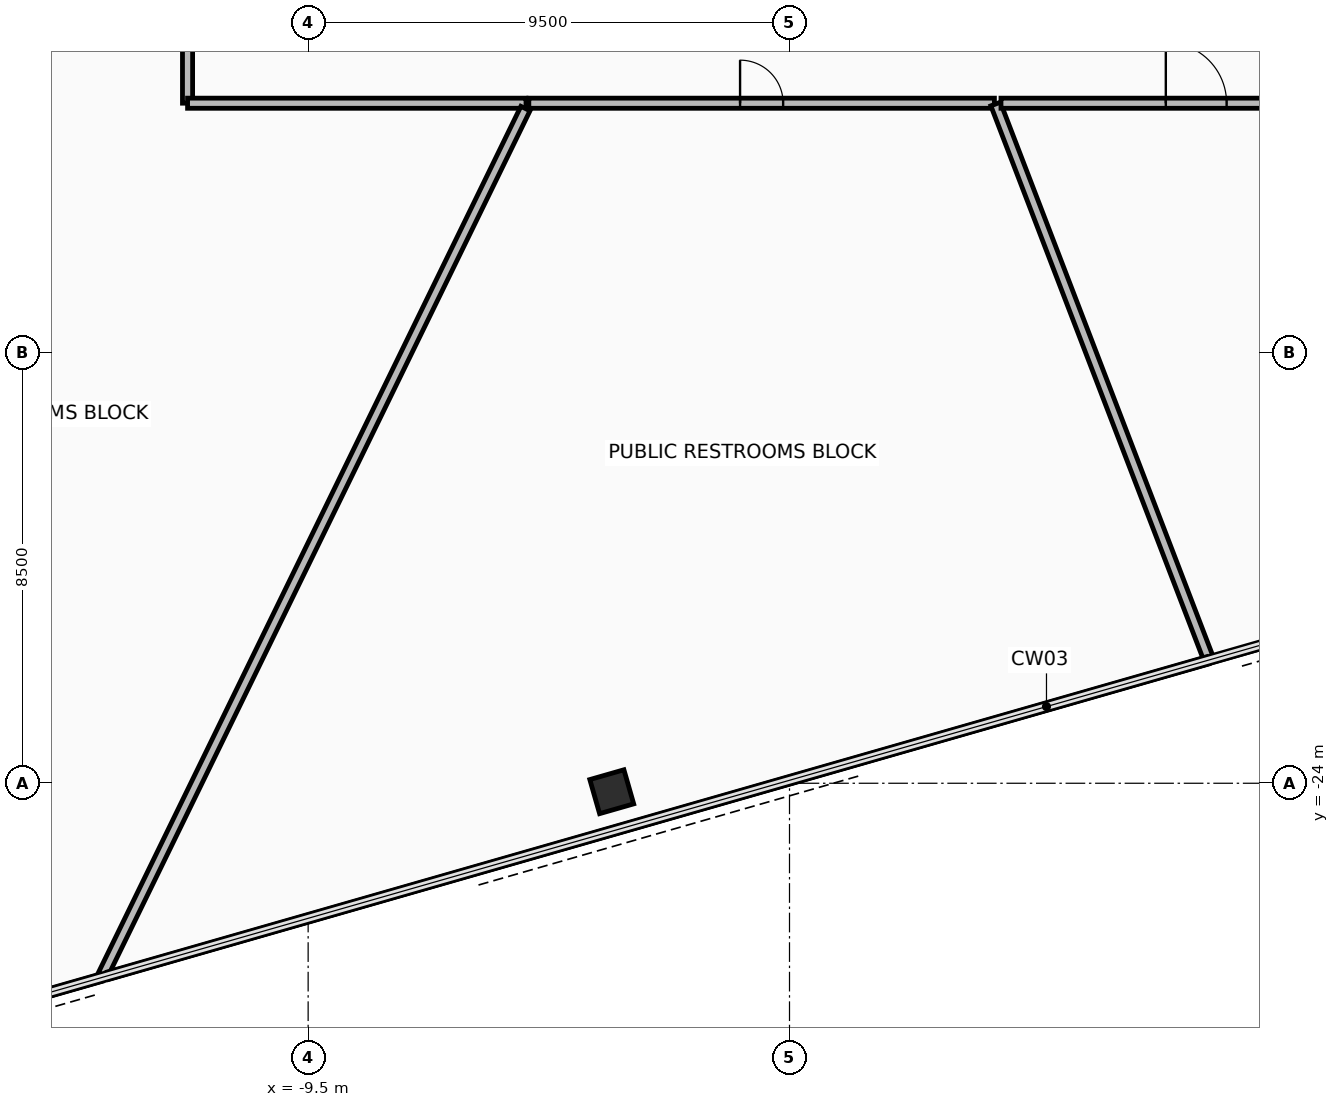
"""IFC4 building model, lengths in metres.
Left out: names, types, materials, properties, quantities, classifications, styles, units other than length and angle.
Written with IfcOpenShell. Run it as: python <this file> out.ifc"""

import sys

from ifc_helpers import new_model, si_unit, direction, frame, frame_2d, origin, origin_2d, place, context, subcontext, project, spatial, rectangle, hollow_rectangle, extrude, element, fill, save


model = new_model("IFC4")
c1 = context("Model", 3, precision=1e-05, world=origin(), true_north=direction((0.0, 1.0)))
c2 = subcontext(c1, "Body", "Model", "MODEL_VIEW")
j1 = project(units=[si_unit("LENGTHUNIT", "METRE"), si_unit("PLANEANGLEUNIT", "RADIAN")], contexts=[c1])
p1 = place(None, origin())
s1 = spatial("IfcSite", under=j1, at=p1, CompositionType="ELEMENT")
p2 = place(p1, origin())
s2 = spatial("IfcBuilding", under=s1, at=p2, CompositionType="ELEMENT")
p3 = place(p2, frame((0.0, 0.0, 86.1)))
s3 = spatial("IfcBuildingStorey", under=s2, at=p3, CompositionType="ELEMENT", Elevation=86.1)
p4 = place(p3, frame((-3.508, -24.167, -0.19), z_axis=(0.0, 0.0, 1.0), x_axis=(0.961261695938, 0.275637355817, 0.0)))
e1 = element("IfcColumn", 1, at=p4, inside=s3, PredefinedType="COLUMN", context=c2, shape_type="SweptSolid", body=[
    extrude(hollow_rectangle(XDim=0.7, YDim=0.7, WallThickness=0.04, at=origin_2d()), origin(), (0.0, 0.0, 1.0), 3.79),
])
p5 = place(p3, frame((-11.88, -3.44, 0.0), z_axis=(0.0, 0.0, 1.0), x_axis=(0.0, -1.0, 0.0)))
e2 = element("IfcWall", 2, at=p5, inside=s3, PredefinedType="PARTITIONING", context=c2, shape_type="SweptSolid", body=[
    extrude(rectangle(XDim=7.14, YDim=0.2, at=frame_2d((3.57, 0.0))), origin(), (0.0, 0.0, 1.0), 2.805),
])
p6 = place(p5, frame((3.145, 0.0, 0.0)))
e3 = element("IfcOpeningElement", 3, at=p6, cuts=e2, PredefinedType="OPENING", context=c2, shape_type="SweptSolid", body=[
    extrude(rectangle(XDim=0.85, YDim=2.1, at=frame_2d((0.425, 1.05))), frame((0.0, 0.11, 0.0), z_axis=(0.0, -1.0, 0.0), x_axis=(1.0, 0.0, 0.0)), (0.0, 0.0, 1.0), 0.22),
])
p7 = place(p3, frame((-11.879, -10.58, 0.0), z_axis=(0.0, 0.0, 1.0), x_axis=(1.0, 0.0, 0.0)))
e4 = element("IfcWall", 4, at=p7, inside=s3, PredefinedType="PARTITIONING", context=c2, shape_type="SweptSolid", body=[
    extrude(rectangle(XDim=6.679, YDim=0.2, at=frame_2d((3.34, 0.0))), origin(), (0.0, 0.0, 1.0), 2.805),
])
p8 = place(p3, frame((-5.211, -10.685, 0.0), z_axis=(0.0, 0.0, 1.0), x_axis=(-0.438373182397, -0.898793053464, 0.0)))
e5 = element("IfcWall", 5, at=p8, inside=s3, PredefinedType="PARTITIONING", context=c2, shape_type="SweptSolid", body=[
    extrude(rectangle(XDim=19.069, YDim=0.2, at=frame_2d((9.535, 0.0))), origin(), (0.0, 0.0, 1.0), 2.605),
])
p9 = place(p3, frame((-13.586, -27.837, 0.0), z_axis=(0.0, 0.0, 1.0), x_axis=(-0.961259140901, -0.275646266135, 0.0)))
e6 = element("IfcWall", 6, at=p9, inside=s3, PredefinedType="PARTITIONING", context=c2, shape_type="SweptSolid", body=[
    extrude(rectangle(XDim=7.841, YDim=0.15, at=frame_2d((3.92, 0.0))), origin(), (0.0, 0.0, 1.0), 3.41),
])
p10 = place(p3, frame((-5.145, -10.58, 0.0), z_axis=(0.0, 0.0, 1.0), x_axis=(1.0, 0.0, 0.0)))
e7 = element("IfcWall", 7, at=p10, inside=s3, PredefinedType="PARTITIONING", context=c2, shape_type="SweptSolid", body=[
    extrude(rectangle(XDim=9.189, YDim=0.2, at=frame_2d((4.594, 0.0))), origin(), (0.0, 0.0, 1.0), 2.805),
])
p11 = place(p10, frame((4.169, 0.0, 0.0)))
e8 = element("IfcOpeningElement", 8, at=p11, cuts=e7, PredefinedType="OPENING", context=c2, shape_type="SweptSolid", body=[
    extrude(rectangle(XDim=0.85, YDim=2.1, at=frame_2d((0.425, 1.05))), frame((0.0, 0.11, 0.0), z_axis=(0.0, -1.0, 0.0), x_axis=(1.0, 0.0, 0.0)), (0.0, 0.0, 1.0), 0.22),
])
p12 = place(p3, frame((4.067, -10.596, 0.0), z_axis=(0.0, 0.0, 1.0), x_axis=(0.358376224971, -0.933577249817, 0.0)))
e9 = element("IfcWall", 9, at=p12, inside=s3, PredefinedType="PARTITIONING", context=c2, shape_type="SweptSolid", body=[
    extrude(rectangle(XDim=11.725, YDim=0.2, at=frame_2d((5.862, 0.0))), origin(), (0.0, 0.0, 1.0), 2.605),
])
p13 = place(p3, frame((8.253, -21.575, 0.0), z_axis=(0.0, 0.0, 1.0), x_axis=(-0.961261412197, -0.275638345338, 0.0)))
e10 = element("IfcWall", 10, at=p13, inside=s3, PredefinedType="PARTITIONING", context=c2, shape_type="SweptSolid", body=[
    extrude(rectangle(XDim=22.567, YDim=0.15, at=frame_2d((11.283, 0.0))), origin(), (0.0, 0.0, 1.0), 3.41),
])
p14 = place(p3, frame((4.174, -10.58, 0.0), z_axis=(0.0, 0.0, 1.0), x_axis=(1.0, 0.0, 0.0)))
e11 = element("IfcWall", 11, at=p14, inside=s3, PredefinedType="PARTITIONING", context=c2, shape_type="SweptSolid", body=[
    extrude(rectangle(XDim=7.706, YDim=0.2, at=frame_2d((3.853, 0.0))), origin(), (0.0, 0.0, 1.0), 2.805),
])
p15 = place(p14, frame((3.253, 0.0, 0.0)))
e12 = element("IfcOpeningElement", 12, at=p15, cuts=e11, PredefinedType="OPENING", context=c2, shape_type="SweptSolid", body=[
    extrude(rectangle(XDim=1.2, YDim=2.15, at=frame_2d((0.6, 1.075))), frame((0.0, 0.11, 0.0), z_axis=(0.0, -1.0, 0.0), x_axis=(1.0, 0.0, 0.0)), (0.0, 0.0, 1.0), 0.22),
])
p16 = place(p11, origin())
e13 = element("IfcDoor", 13, at=p16, inside=s3, OperationType="SINGLE_SWING_RIGHT", PredefinedType="DOOR", context=c2, shape_type="SweptSolid", body=[
    extrude(rectangle(XDim=0.85, YDim=2.1, at=frame_2d((0.425, 1.05))), frame((0.0, 0.025, 0.0), z_axis=(0.0, -1.0, 0.0), x_axis=(1.0, 0.0, 0.0)), (0.0, 0.0, 1.0), 0.05),
])
fill(e8, e13)
p17 = place(p15, origin())
e14 = element("IfcDoor", 14, at=p17, inside=s3, OperationType="SINGLE_SWING_LEFT", PredefinedType="DOOR", context=c2, shape_type="SweptSolid", body=[
    extrude(rectangle(XDim=1.2, YDim=2.15, at=frame_2d((0.6, 1.075))), frame((0.0, 0.025, 0.0), z_axis=(0.0, -1.0, 0.0), x_axis=(1.0, 0.0, 0.0)), (0.0, 0.0, 1.0), 0.05),
])
fill(e12, e14)
save(model, sys.argv[1])
